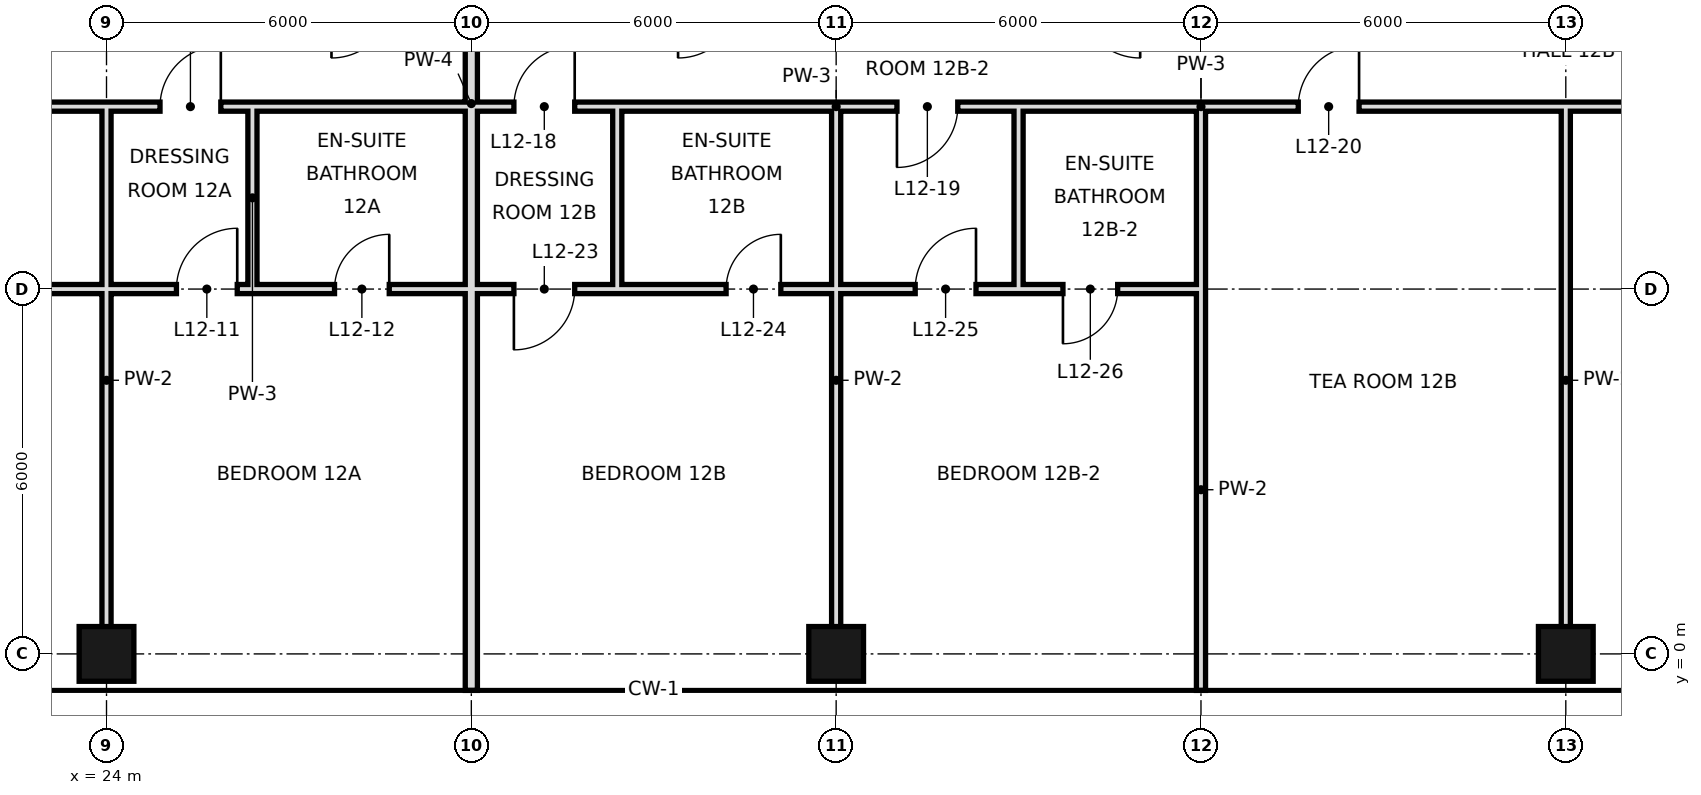
"""IFC4 building model, lengths in metres.
Left out: names, types, materials, properties, quantities, classifications, styles, units other than length and angle.
Written with IfcOpenShell. Run it as: python <this file> out.ifc"""

import sys

from ifc_helpers import new_model, si_unit, direction, frame, frame_2d, origin, origin_2d, place, context, subcontext, project, spatial, rectangle, hollow_rectangle, extrude, element, fill, save


model = new_model("IFC4")
c1 = context("Model", 3, precision=1e-05, world=origin(), true_north=direction((0.0, 1.0)))
c2 = subcontext(c1, "Body", "Model", "MODEL_VIEW")
j1 = project(units=[si_unit("LENGTHUNIT", "METRE"), si_unit("PLANEANGLEUNIT", "RADIAN")], contexts=[c1])
p1 = place(None, origin())
s1 = spatial("IfcSite", under=j1, at=p1, CompositionType="ELEMENT")
p2 = place(p1, origin())
s2 = spatial("IfcBuilding", under=s1, at=p2, CompositionType="ELEMENT")
p3 = place(p2, frame((0.0, 0.0, 64.2)))
s3 = spatial("IfcBuildingStorey", under=s2, at=p3, CompositionType="ELEMENT", Elevation=64.2)
for number, where, z_axis, x_axis in (
    (1, (24.0, 0.0, 0.0), (0.0, 0.0, 1.0), (1.0, 0.0, 0.0)),
    (2, (36.0, 0.0, 0.0), (0.0, 0.0, 1.0), (1.0, 0.0, 0.0)),
    (3, (48.0, 0.0, 0.0), (0.0, 0.0, 1.0), (1.0, 0.0, 0.0)),
):
    element("IfcColumn", number, at=place(p3, frame(where, z_axis=z_axis, x_axis=x_axis)), inside=s3, PredefinedType="COLUMN", context=c2, shape_type="SweptSolid", body=[
        extrude(hollow_rectangle(XDim=0.9, YDim=0.9, WallThickness=0.045, at=origin_2d()), origin(), (0.0, 0.0, 1.0), 3.6),
    ])
p4 = place(p3, frame((24.0, 0.0, 0.0), z_axis=(0.0, 0.0, 1.0), x_axis=(0.0, 1.0, 0.0)))
e4 = element("IfcWall", 4, at=p4, inside=s3, PredefinedType="PARTITIONING", context=c2, shape_type="SweptSolid", body=[
    extrude(rectangle(XDim=9.0, YDim=0.15, at=frame_2d((4.5, 0.0))), origin(), (0.0, 0.0, 1.0), 2.72),
])
p5 = place(p3, frame((26.4, 6.0, 0.0), z_axis=(0.0, 0.0, 1.0), x_axis=(0.0, 1.0, 0.0)))
e5 = element("IfcWall", 5, at=p5, inside=s3, PredefinedType="PARTITIONING", context=c2, shape_type="SweptSolid", body=[
    extrude(rectangle(XDim=3.0, YDim=0.15, at=frame_2d((1.5, 0.0))), origin(), (0.0, 0.0, 1.0), 3.42),
])
p6 = place(p3, frame((30.0, -0.6, 0.0), z_axis=(0.0, 0.0, 1.0), x_axis=(0.0, 1.0, 0.0)))
e6 = element("IfcWall", 6, at=p6, inside=s3, PredefinedType="SOLIDWALL", context=c2, shape_type="SweptSolid", body=[
    extrude(rectangle(XDim=19.3, YDim=0.2, at=frame_2d((9.65, 0.0))), origin(), (0.0, 0.0, 1.0), 2.72),
])
p7 = place(p3, frame((32.4, 6.0, 0.0), z_axis=(0.0, 0.0, 1.0), x_axis=(0.0, 1.0, 0.0)))
e7 = element("IfcWall", 7, at=p7, inside=s3, PredefinedType="PARTITIONING", context=c2, shape_type="SweptSolid", body=[
    extrude(rectangle(XDim=3.0, YDim=0.15, at=frame_2d((1.5, 0.0))), origin(), (0.0, 0.0, 1.0), 3.42),
])
p8 = place(p3, frame((36.0, 0.0, 0.0), z_axis=(0.0, 0.0, 1.0), x_axis=(0.0, 1.0, 0.0)))
e8 = element("IfcWall", 8, at=p8, inside=s3, PredefinedType="PARTITIONING", context=c2, shape_type="SweptSolid", body=[
    extrude(rectangle(XDim=6.0, YDim=0.15, at=frame_2d((3.0, 0.0))), origin(), (0.0, 0.0, 1.0), 2.72),
])
p9 = place(p3, frame((36.0, 6.0, 0.0), z_axis=(0.0, 0.0, 1.0), x_axis=(0.0, 1.0, 0.0)))
e9 = element("IfcWall", 9, at=p9, inside=s3, PredefinedType="PARTITIONING", context=c2, shape_type="SweptSolid", body=[
    extrude(rectangle(XDim=3.0, YDim=0.15, at=frame_2d((1.5, 0.0))), origin(), (0.0, 0.0, 1.0), 2.72),
])
p10 = place(p3, frame((39.0, 6.0, 0.0), z_axis=(0.0, 0.0, 1.0), x_axis=(0.0, 1.0, 0.0)))
e10 = element("IfcWall", 10, at=p10, inside=s3, PredefinedType="PARTITIONING", context=c2, shape_type="SweptSolid", body=[
    extrude(rectangle(XDim=3.0, YDim=0.15, at=frame_2d((1.5, 0.0))), origin(), (0.0, 0.0, 1.0), 3.42),
])
p11 = place(p3, frame((42.0, -0.6, 0.0), z_axis=(0.0, 0.0, 1.0), x_axis=(0.0, 1.0, 0.0)))
e11 = element("IfcWall", 11, at=p11, inside=s3, PredefinedType="PARTITIONING", context=c2, shape_type="SweptSolid", body=[
    extrude(rectangle(XDim=6.6, YDim=0.15, at=frame_2d((3.3, 0.0))), origin(), (0.0, 0.0, 1.0), 2.72),
])
p12 = place(p3, frame((42.0, 6.0, 0.0), z_axis=(0.0, 0.0, 1.0), x_axis=(0.0, 1.0, 0.0)))
e12 = element("IfcWall", 12, at=p12, inside=s3, PredefinedType="PARTITIONING", context=c2, shape_type="SweptSolid", body=[
    extrude(rectangle(XDim=3.0, YDim=0.15, at=frame_2d((1.5, 0.0))), origin(), (0.0, 0.0, 1.0), 2.72),
])
p13 = place(p3, frame((48.0, 0.0, 0.0), z_axis=(0.0, 0.0, 1.0), x_axis=(0.0, 1.0, 0.0)))
e13 = element("IfcWall", 13, at=p13, inside=s3, PredefinedType="PARTITIONING", context=c2, shape_type="SweptSolid", body=[
    extrude(rectangle(XDim=9.0, YDim=0.15, at=frame_2d((4.5, 0.0))), origin(), (0.0, 0.0, 1.0), 2.72),
])
p14 = place(p3, frame((0.0, 6.0, 0.0), z_axis=(0.0, 0.0, 1.0), x_axis=(1.0, 0.0, 0.0)))
e14 = element("IfcWall", 14, at=p14, inside=s3, PredefinedType="PARTITIONING", context=c2, shape_type="SweptSolid", body=[
    extrude(rectangle(XDim=26.4, YDim=0.15, at=frame_2d((13.2, 0.0))), origin(), (0.0, 0.0, 1.0), 2.97),
])
p15 = place(p14, frame((5.1, 0.0, 0.0)))
e15 = element("IfcOpeningElement", 15, at=p15, cuts=e14, PredefinedType="OPENING", context=c2, shape_type="SweptSolid", body=[
    extrude(rectangle(XDim=1.8, YDim=2.4, at=frame_2d((0.9, 1.2))), frame((0.0, 0.085, 0.0), z_axis=(0.0, -1.0, 0.0), x_axis=(1.0, 0.0, 0.0)), (0.0, 0.0, 1.0), 0.17),
])
p16 = place(p14, frame((12.25, 0.0, 0.0)))
e16 = element("IfcOpeningElement", 16, at=p16, cuts=e14, PredefinedType="OPENING", context=c2, shape_type="SweptSolid", body=[
    extrude(rectangle(XDim=1.8, YDim=2.4, at=frame_2d((0.9, 1.2))), frame((0.0, 0.085, 0.0), z_axis=(0.0, -1.0, 0.0), x_axis=(1.0, 0.0, 0.0)), (0.0, 0.0, 1.0), 0.17),
])
p17 = place(p14, frame((25.15, 0.0, 0.0)))
e17 = element("IfcOpeningElement", 17, at=p17, cuts=e14, PredefinedType="OPENING", context=c2, shape_type="SweptSolid", body=[
    extrude(rectangle(XDim=1.0, YDim=2.4, at=frame_2d((0.5, 1.2))), frame((0.0, 0.085, 0.0), z_axis=(0.0, -1.0, 0.0), x_axis=(1.0, 0.0, 0.0)), (0.0, 0.0, 1.0), 0.17),
])
p18 = place(p3, frame((30.0, 6.0, 0.0), z_axis=(0.0, 0.0, 1.0), x_axis=(1.0, 0.0, 0.0)))
e18 = element("IfcWall", 18, at=p18, inside=s3, PredefinedType="PARTITIONING", context=c2, shape_type="SweptSolid", body=[
    extrude(rectangle(XDim=2.4, YDim=0.15, at=frame_2d((1.2, 0.0))), origin(), (0.0, 0.0, 1.0), 2.97),
])
p19 = place(p18, frame((0.7, 0.0, 0.0)))
e19 = element("IfcOpeningElement", 19, at=p19, cuts=e18, PredefinedType="OPENING", context=c2, shape_type="SweptSolid", body=[
    extrude(rectangle(XDim=1.0, YDim=2.4, at=frame_2d((0.5, 1.2))), frame((0.0, 0.085, 0.0), z_axis=(0.0, -1.0, 0.0), x_axis=(1.0, 0.0, 0.0)), (0.0, 0.0, 1.0), 0.17),
])
p20 = place(p3, frame((36.0, 6.0, 0.0), z_axis=(0.0, 0.0, 1.0), x_axis=(1.0, 0.0, 0.0)))
e20 = element("IfcWall", 20, at=p20, inside=s3, PredefinedType="PARTITIONING", context=c2, shape_type="SweptSolid", body=[
    extrude(rectangle(XDim=3.0, YDim=0.15, at=frame_2d((1.5, 0.0))), origin(), (0.0, 0.0, 1.0), 2.97),
])
p21 = place(p20, frame((1.3, 0.0, 0.0)))
e21 = element("IfcOpeningElement", 21, at=p21, cuts=e20, PredefinedType="OPENING", context=c2, shape_type="SweptSolid", body=[
    extrude(rectangle(XDim=1.0, YDim=2.4, at=frame_2d((0.5, 1.2))), frame((0.0, 0.085, 0.0), z_axis=(0.0, -1.0, 0.0), x_axis=(1.0, 0.0, 0.0)), (0.0, 0.0, 1.0), 0.17),
])
p22 = place(p3, frame((26.4, 6.0, 0.0), z_axis=(0.0, 0.0, 1.0), x_axis=(1.0, 0.0, 0.0)))
e22 = element("IfcWall", 22, at=p22, inside=s3, PredefinedType="PARTITIONING", context=c2, shape_type="SweptSolid", body=[
    extrude(rectangle(XDim=3.6, YDim=0.15, at=frame_2d((1.8, 0.0))), origin(), (0.0, 0.0, 1.0), 2.97),
])
p23 = place(p22, frame((1.35, 0.0, 0.0)))
e23 = element("IfcOpeningElement", 23, at=p23, cuts=e22, PredefinedType="OPENING", context=c2, shape_type="SweptSolid", body=[
    extrude(rectangle(XDim=0.9, YDim=2.4, at=frame_2d((0.45, 1.2))), frame((0.0, 0.085, 0.0), z_axis=(0.0, -1.0, 0.0), x_axis=(1.0, 0.0, 0.0)), (0.0, 0.0, 1.0), 0.17),
])
p24 = place(p3, frame((32.4, 6.0, 0.0), z_axis=(0.0, 0.0, 1.0), x_axis=(1.0, 0.0, 0.0)))
e24 = element("IfcWall", 24, at=p24, inside=s3, PredefinedType="PARTITIONING", context=c2, shape_type="SweptSolid", body=[
    extrude(rectangle(XDim=3.6, YDim=0.15, at=frame_2d((1.8, 0.0))), origin(), (0.0, 0.0, 1.0), 2.97),
])
p25 = place(p24, frame((1.79, 0.0, 0.0)))
e25 = element("IfcOpeningElement", 25, at=p25, cuts=e24, PredefinedType="OPENING", context=c2, shape_type="SweptSolid", body=[
    extrude(rectangle(XDim=0.9, YDim=2.4, at=frame_2d((0.45, 1.2))), frame((0.0, 0.085, 0.0), z_axis=(0.0, -1.0, 0.0), x_axis=(1.0, 0.0, 0.0)), (0.0, 0.0, 1.0), 0.17),
])
p26 = place(p3, frame((39.0, 6.0, 0.0), z_axis=(0.0, 0.0, 1.0), x_axis=(1.0, 0.0, 0.0)))
e26 = element("IfcWall", 26, at=p26, inside=s3, PredefinedType="PARTITIONING", context=c2, shape_type="SweptSolid", body=[
    extrude(rectangle(XDim=3.0, YDim=0.15, at=frame_2d((1.5, 0.0))), origin(), (0.0, 0.0, 1.0), 2.97),
])
p27 = place(p26, frame((0.73, 0.0, 0.0)))
e27 = element("IfcOpeningElement", 27, at=p27, cuts=e26, PredefinedType="OPENING", context=c2, shape_type="SweptSolid", body=[
    extrude(rectangle(XDim=0.9, YDim=2.4, at=frame_2d((0.45, 1.2))), frame((0.0, 0.085, 0.0), z_axis=(0.0, -1.0, 0.0), x_axis=(1.0, 0.0, 0.0)), (0.0, 0.0, 1.0), 0.17),
])
p28 = place(p3, frame((-0.6, 9.0, 0.0), z_axis=(0.0, 0.0, 1.0), x_axis=(1.0, 0.0, 0.0)))
e28 = element("IfcWall", 28, at=p28, inside=s3, PredefinedType="PARTITIONING", context=c2, shape_type="SweptSolid", body=[
    extrude(rectangle(XDim=27.0, YDim=0.15, at=frame_2d((13.5, 0.0))), origin(), (0.0, 0.0, 1.0), 3.42),
])
p29 = place(p28, frame((5.7, 0.0, 0.0)))
e29 = element("IfcOpeningElement", 29, at=p29, cuts=e28, PredefinedType="OPENING", context=c2, shape_type="SweptSolid", body=[
    extrude(rectangle(XDim=1.8, YDim=2.4, at=frame_2d((0.9, 1.2))), frame((0.0, 0.085, 0.0), z_axis=(0.0, -1.0, 0.0), x_axis=(1.0, 0.0, 0.0)), (0.0, 0.0, 1.0), 0.17),
])
p30 = place(p28, frame((17.7, 0.0, 0.0)))
e30 = element("IfcOpeningElement", 30, at=p30, cuts=e28, PredefinedType="OPENING", context=c2, shape_type="SweptSolid", body=[
    extrude(rectangle(XDim=1.8, YDim=2.4, at=frame_2d((0.9, 1.2))), frame((0.0, 0.085, 0.0), z_axis=(0.0, -1.0, 0.0), x_axis=(1.0, 0.0, 0.0)), (0.0, 0.0, 1.0), 0.17),
])
p31 = place(p28, frame((25.48, 0.0, 0.0)))
e31 = element("IfcOpeningElement", 31, at=p31, cuts=e28, PredefinedType="OPENING", context=c2, shape_type="SweptSolid", body=[
    extrude(rectangle(XDim=1.0, YDim=2.4, at=frame_2d((0.5, 1.2))), frame((0.0, 0.085, 0.0), z_axis=(0.0, -1.0, 0.0), x_axis=(1.0, 0.0, 0.0)), (0.0, 0.0, 1.0), 0.17),
])
p32 = place(p3, frame((30.0, 9.0, 0.0), z_axis=(0.0, 0.0, 1.0), x_axis=(1.0, 0.0, 0.0)))
e32 = element("IfcWall", 32, at=p32, inside=s3, PredefinedType="PARTITIONING", context=c2, shape_type="SweptSolid", body=[
    extrude(rectangle(XDim=2.4, YDim=0.15, at=frame_2d((1.2, 0.0))), origin(), (0.0, 0.0, 1.0), 3.42),
])
p33 = place(p32, frame((0.7, 0.0, 0.0)))
e33 = element("IfcOpeningElement", 33, at=p33, cuts=e32, PredefinedType="OPENING", context=c2, shape_type="SweptSolid", body=[
    extrude(rectangle(XDim=1.0, YDim=2.4, at=frame_2d((0.5, 1.2))), frame((0.0, 0.085, 0.0), z_axis=(0.0, -1.0, 0.0), x_axis=(1.0, 0.0, 0.0)), (0.0, 0.0, 1.0), 0.17),
])
p34 = place(p3, frame((36.0, 9.0, 0.0), z_axis=(0.0, 0.0, 1.0), x_axis=(1.0, 0.0, 0.0)))
e34 = element("IfcWall", 34, at=p34, inside=s3, PredefinedType="PARTITIONING", context=c2, shape_type="SweptSolid", body=[
    extrude(rectangle(XDim=3.0, YDim=0.15, at=frame_2d((1.5, 0.0))), origin(), (0.0, 0.0, 1.0), 3.42),
])
p35 = place(p34, frame((1.0, 0.0, 0.0)))
e35 = element("IfcOpeningElement", 35, at=p35, cuts=e34, PredefinedType="OPENING", context=c2, shape_type="SweptSolid", body=[
    extrude(rectangle(XDim=1.0, YDim=2.4, at=frame_2d((0.5, 1.2))), frame((0.0, 0.085, 0.0), z_axis=(0.0, -1.0, 0.0), x_axis=(1.0, 0.0, 0.0)), (0.0, 0.0, 1.0), 0.17),
])
p36 = place(p3, frame((42.0, 9.0, 0.0), z_axis=(0.0, 0.0, 1.0), x_axis=(1.0, 0.0, 0.0)))
e36 = element("IfcWall", 36, at=p36, inside=s3, PredefinedType="PARTITIONING", context=c2, shape_type="SweptSolid", body=[
    extrude(rectangle(XDim=24.6, YDim=0.15, at=frame_2d((12.3, 0.0))), origin(), (0.0, 0.0, 1.0), 3.42),
])
p37 = place(p36, frame((1.6, 0.0, 0.0)))
e37 = element("IfcOpeningElement", 37, at=p37, cuts=e36, PredefinedType="OPENING", context=c2, shape_type="SweptSolid", body=[
    extrude(rectangle(XDim=1.0, YDim=2.4, at=frame_2d((0.5, 1.2))), frame((0.0, 0.085, 0.0), z_axis=(0.0, -1.0, 0.0), x_axis=(1.0, 0.0, 0.0)), (0.0, 0.0, 1.0), 0.17),
])
p38 = place(p36, frame((8.5, 0.0, 0.0)))
e38 = element("IfcOpeningElement", 38, at=p38, cuts=e36, PredefinedType="OPENING", context=c2, shape_type="SweptSolid", body=[
    extrude(rectangle(XDim=1.0, YDim=2.4, at=frame_2d((0.5, 1.2))), frame((0.0, 0.085, 0.0), z_axis=(0.0, -1.0, 0.0), x_axis=(1.0, 0.0, 0.0)), (0.0, 0.0, 1.0), 0.17),
])
p39 = place(p36, frame((12.25, 0.0, 0.0)))
e39 = element("IfcOpeningElement", 39, at=p39, cuts=e36, PredefinedType="OPENING", context=c2, shape_type="SweptSolid", body=[
    extrude(rectangle(XDim=1.8, YDim=2.4, at=frame_2d((0.9, 1.2))), frame((0.0, 0.085, 0.0), z_axis=(0.0, -1.0, 0.0), x_axis=(1.0, 0.0, 0.0)), (0.0, 0.0, 1.0), 0.17),
])
for number, where, z_axis, x_axis in (
    (40, (26.4, 9.0, 0.0), (0.0, 0.0, 1.0), (1.0, 0.0, 0.0)),
    (41, (32.4, 9.0, 0.0), (0.0, 0.0, 1.0), (1.0, 0.0, 0.0)),
):
    element("IfcWall", number, at=place(p3, frame(where, z_axis=z_axis, x_axis=x_axis)), inside=s3, PredefinedType="PARTITIONING", context=c2, shape_type="SweptSolid", body=[
        extrude(rectangle(XDim=3.6, YDim=0.15, at=frame_2d((1.8, 0.0))), origin(), (0.0, 0.0, 1.0), 3.42),
    ])
p40 = place(p3, frame((39.0, 9.0, 0.0), z_axis=(0.0, 0.0, 1.0), x_axis=(1.0, 0.0, 0.0)))
e42 = element("IfcWall", 42, at=p40, inside=s3, PredefinedType="PARTITIONING", context=c2, shape_type="SweptSolid", body=[
    extrude(rectangle(XDim=3.0, YDim=0.15, at=frame_2d((1.5, 0.0))), origin(), (0.0, 0.0, 1.0), 3.42),
])
p41 = place(p31, frame((1.0, 0.0, 0.0), z_axis=(0.0, 0.0, 1.0), x_axis=(-1.0, 0.0, 0.0)))
e43 = element("IfcDoor", 43, at=p41, inside=s3, OperationType="SINGLE_SWING_LEFT", PredefinedType="DOOR", context=c2, shape_type="SweptSolid", body=[
    extrude(rectangle(XDim=1.0, YDim=2.4, at=frame_2d((0.5, 1.2))), frame((0.0, 0.025, 0.0), z_axis=(0.0, -1.0, 0.0), x_axis=(1.0, 0.0, 0.0)), (0.0, 0.0, 1.0), 0.05),
])
fill(e31, e43)
p42 = place(p17, frame((1.0, 0.0, 0.0), z_axis=(0.0, 0.0, 1.0), x_axis=(-1.0, 0.0, 0.0)))
e44 = element("IfcDoor", 44, at=p42, inside=s3, OperationType="SINGLE_SWING_LEFT", PredefinedType="DOOR", context=c2, shape_type="SweptSolid", body=[
    extrude(rectangle(XDim=1.0, YDim=2.4, at=frame_2d((0.5, 1.2))), frame((0.0, 0.025, 0.0), z_axis=(0.0, -1.0, 0.0), x_axis=(1.0, 0.0, 0.0)), (0.0, 0.0, 1.0), 0.05),
])
fill(e17, e44)
p43 = place(p23, frame((0.9, 0.0, 0.0), z_axis=(0.0, 0.0, 1.0), x_axis=(-1.0, 0.0, 0.0)))
e45 = element("IfcDoor", 45, at=p43, inside=s3, OperationType="SINGLE_SWING_LEFT", PredefinedType="DOOR", context=c2, shape_type="SweptSolid", body=[
    extrude(rectangle(XDim=0.9, YDim=2.4, at=frame_2d((0.45, 1.2))), frame((0.0, 0.025, 0.0), z_axis=(0.0, -1.0, 0.0), x_axis=(1.0, 0.0, 0.0)), (0.0, 0.0, 1.0), 0.05),
])
fill(e23, e45)
p44 = place(p33, frame((1.0, 0.0, 0.0), z_axis=(0.0, 0.0, 1.0), x_axis=(-1.0, 0.0, 0.0)))
e46 = element("IfcDoor", 46, at=p44, inside=s3, OperationType="SINGLE_SWING_LEFT", PredefinedType="DOOR", context=c2, shape_type="SweptSolid", body=[
    extrude(rectangle(XDim=1.0, YDim=2.4, at=frame_2d((0.5, 1.2))), frame((0.0, 0.025, 0.0), z_axis=(0.0, -1.0, 0.0), x_axis=(1.0, 0.0, 0.0)), (0.0, 0.0, 1.0), 0.05),
])
fill(e33, e46)
p45 = place(p35, frame((1.0, 0.0, 0.0), z_axis=(0.0, 0.0, 1.0), x_axis=(-1.0, 0.0, 0.0)))
e47 = element("IfcDoor", 47, at=p45, inside=s3, OperationType="SINGLE_SWING_RIGHT", PredefinedType="DOOR", context=c2, shape_type="SweptSolid", body=[
    extrude(rectangle(XDim=1.0, YDim=2.4, at=frame_2d((0.5, 1.2))), frame((0.0, 0.025, 0.0), z_axis=(0.0, -1.0, 0.0), x_axis=(1.0, 0.0, 0.0)), (0.0, 0.0, 1.0), 0.05),
])
fill(e35, e47)
p46 = place(p37, frame((1.0, 0.0, 0.0), z_axis=(0.0, 0.0, 1.0), x_axis=(-1.0, 0.0, 0.0)))
e48 = element("IfcDoor", 48, at=p46, inside=s3, OperationType="SINGLE_SWING_LEFT", PredefinedType="DOOR", context=c2, shape_type="SweptSolid", body=[
    extrude(rectangle(XDim=1.0, YDim=2.4, at=frame_2d((0.5, 1.2))), frame((0.0, 0.025, 0.0), z_axis=(0.0, -1.0, 0.0), x_axis=(1.0, 0.0, 0.0)), (0.0, 0.0, 1.0), 0.05),
])
fill(e37, e48)
p47 = place(p19, frame((1.0, 0.0, 0.0), z_axis=(0.0, 0.0, 1.0), x_axis=(-1.0, 0.0, 0.0)))
e49 = element("IfcDoor", 49, at=p47, inside=s3, OperationType="SINGLE_SWING_RIGHT", PredefinedType="DOOR", context=c2, shape_type="SweptSolid", body=[
    extrude(rectangle(XDim=1.0, YDim=2.4, at=frame_2d((0.5, 1.2))), frame((0.0, 0.025, 0.0), z_axis=(0.0, -1.0, 0.0), x_axis=(1.0, 0.0, 0.0)), (0.0, 0.0, 1.0), 0.05),
])
fill(e19, e49)
p48 = place(p25, frame((0.9, 0.0, 0.0), z_axis=(0.0, 0.0, 1.0), x_axis=(-1.0, 0.0, 0.0)))
e50 = element("IfcDoor", 50, at=p48, inside=s3, OperationType="SINGLE_SWING_LEFT", PredefinedType="DOOR", context=c2, shape_type="SweptSolid", body=[
    extrude(rectangle(XDim=0.9, YDim=2.4, at=frame_2d((0.45, 1.2))), frame((0.0, 0.025, 0.0), z_axis=(0.0, -1.0, 0.0), x_axis=(1.0, 0.0, 0.0)), (0.0, 0.0, 1.0), 0.05),
])
fill(e25, e50)
p49 = place(p21, frame((1.0, 0.0, 0.0), z_axis=(0.0, 0.0, 1.0), x_axis=(-1.0, 0.0, 0.0)))
e51 = element("IfcDoor", 51, at=p49, inside=s3, OperationType="SINGLE_SWING_LEFT", PredefinedType="DOOR", context=c2, shape_type="SweptSolid", body=[
    extrude(rectangle(XDim=1.0, YDim=2.4, at=frame_2d((0.5, 1.2))), frame((0.0, 0.025, 0.0), z_axis=(0.0, -1.0, 0.0), x_axis=(1.0, 0.0, 0.0)), (0.0, 0.0, 1.0), 0.05),
])
fill(e21, e51)
p50 = place(p27, frame((0.9, 0.0, 0.0), z_axis=(0.0, 0.0, 1.0), x_axis=(-1.0, 0.0, 0.0)))
e52 = element("IfcDoor", 52, at=p50, inside=s3, OperationType="SINGLE_SWING_RIGHT", PredefinedType="DOOR", context=c2, shape_type="SweptSolid", body=[
    extrude(rectangle(XDim=0.9, YDim=2.4, at=frame_2d((0.45, 1.2))), frame((0.0, 0.025, 0.0), z_axis=(0.0, -1.0, 0.0), x_axis=(1.0, 0.0, 0.0)), (0.0, 0.0, 1.0), 0.05),
])
fill(e27, e52)
save(model, sys.argv[1])
